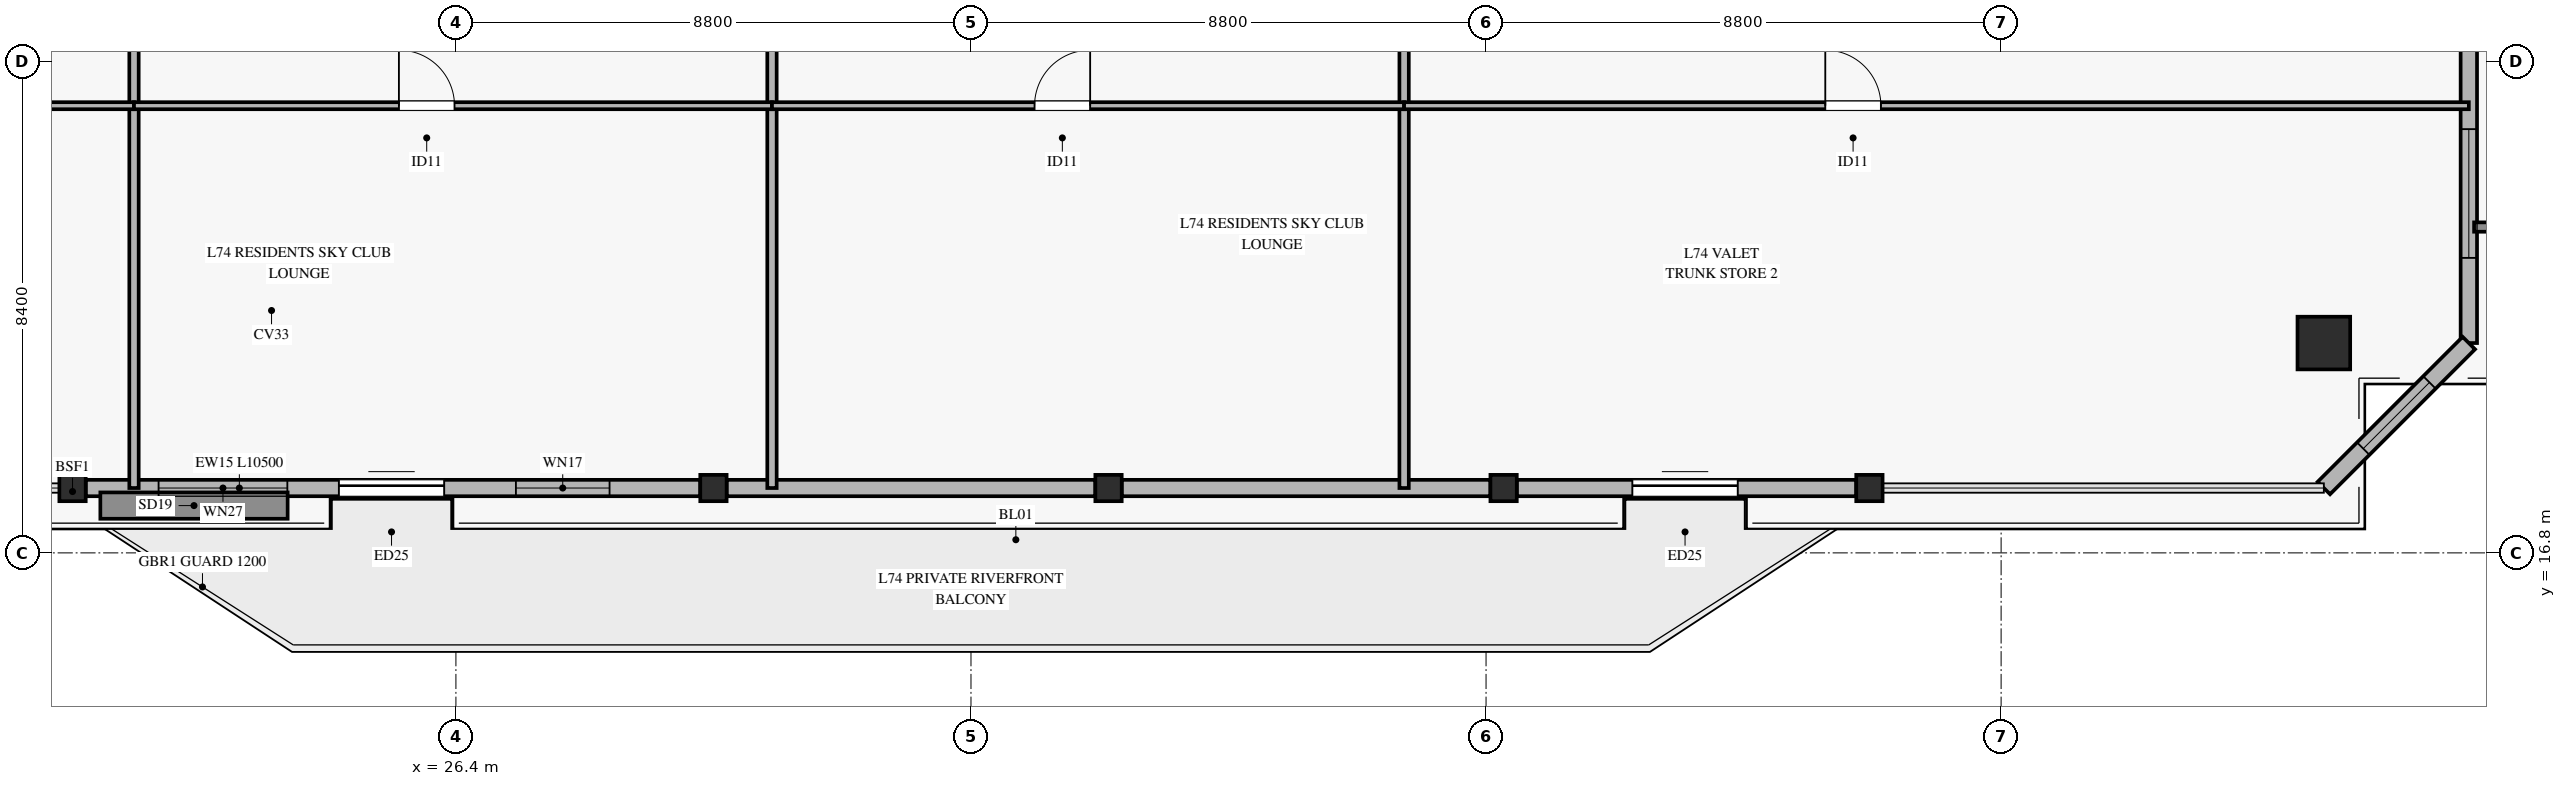
"""IFC4 building model, lengths in metres.
Left out: names, types, materials, properties, quantities, classifications, styles, units other than length and angle.
Written with IfcOpenShell. Run it as: python <this file> out.ifc"""

import sys

from ifc_helpers import new_model, si_unit, direction, frame, frame_2d, origin, origin_2d, place, context, subcontext, project, spatial, rectangle, hollow_rectangle, extrude, source, transform, mapped, element, fill, save


model = new_model("IFC4")
c1 = context("Model", 3, precision=1e-05, world=origin(), true_north=direction((0.0, 1.0)))
c2 = subcontext(c1, "Body", "Model", "MODEL_VIEW")
j1 = project(units=[si_unit("LENGTHUNIT", "METRE"), si_unit("PLANEANGLEUNIT", "RADIAN")], contexts=[c1])
p1 = place(None, origin())
s1 = spatial("IfcSite", under=j1, at=p1, CompositionType="ELEMENT")
p2 = place(p1, origin())
s2 = spatial("IfcBuilding", under=s1, at=p2, CompositionType="ELEMENT")
p3 = place(p2, frame((0.0, 0.0, 290.4)))
s3 = spatial("IfcBuildingStorey", under=s2, at=p3, CompositionType="ELEMENT", Elevation=290.4)
m1 = source(origin(), c2, "Body", "SweptSolid", [
    extrude(hollow_rectangle(XDim=0.9, YDim=0.9, WallThickness=0.04, at=origin_2d()), origin(), (0.0, 0.0, 1.0), 3.327),
])
p4 = place(p3, frame((58.314, 20.385, 0.0), z_axis=(-0.110887345502, 0.266613981607, 0.957403249117), x_axis=(-0.923324865032, -0.384019782842, 0.0)))
e1 = element("IfcColumn", 1, at=p4, inside=s3, PredefinedType="COLUMN", context=c2, shape_type="MappedRepresentation", body=[
    mapped(m1, transform((0.0, 0.0, 0.0), x_axis=(1.0, 0.0, 0.0), y_axis=(0.0, 1.0, 0.0), z_axis=(0.0, 0.0, 1.0), scale=1.0)),
])
m2 = source(origin(), c2, "Body", "SweptSolid", [
    extrude(hollow_rectangle(XDim=0.45, YDim=0.45, WallThickness=0.022, at=origin_2d()), origin(), (0.0, 0.0, 1.0), 3.319),
])
for number, where, z_axis, x_axis in (
    (2, (19.85, 17.908, 0.0), (0.0, 0.281, 0.96), (-1.0, 0.0, 0.0)),
    (3, (30.8, 17.908, 0.0), (0.0, 0.281, 0.96), (-1.0, 0.0, 0.0)),
    (4, (37.55, 17.908, 0.0), (0.0, 0.281, 0.96), (-1.0, 0.0, 0.0)),
    (5, (44.3, 17.908, 0.0), (0.0, 0.281, 0.96), (-1.0, 0.0, 0.0)),
    (6, (50.55, 17.908, 0.0), (0.0, 0.281, 0.96), (-1.0, 0.0, 0.0)),
):
    element("IfcColumn", number, at=place(p3, frame(where, z_axis=z_axis, x_axis=x_axis)), inside=s3, PredefinedType="COLUMN", context=c2, shape_type="MappedRepresentation", body=[
        mapped(m2, transform((0.0, 0.0, 0.0), x_axis=(1.0, 0.0, 0.0), y_axis=(0.0, 1.0, 0.0), z_axis=(0.0, 0.0, 1.0), scale=1.0)),
    ])
p5 = place(p3, frame((20.075, 17.908, 0.0), z_axis=(0.0, 0.0, 1.0), x_axis=(1.0, 0.0, 0.0)))
e7 = element("IfcWall", 7, at=p5, inside=s3, PredefinedType="SOLIDWALL", context=c2, shape_type="SweptSolid", body=[
    extrude(rectangle(XDim=10.5, YDim=0.28, at=frame_2d((5.25, 0.0))), origin(), (0.0, 0.0, 1.0), 2.815),
])
p6 = place(p5, frame((4.325, 0.0, 0.0)))
e8 = element("IfcOpeningElement", 8, at=p6, cuts=e7, PredefinedType="OPENING", context=c2, shape_type="SweptSolid", body=[
    extrude(rectangle(XDim=1.8, YDim=2.25, at=frame_2d((0.9, 1.125))), frame((0.0, 0.15, 0.0), z_axis=(0.0, -1.0, 0.0), x_axis=(1.0, 0.0, 0.0)), (0.0, 0.0, 1.0), 0.3),
])
p7 = place(p5, frame((1.245, 0.0, 0.45)))
e9 = element("IfcOpeningElement", 9, at=p7, cuts=e7, PredefinedType="OPENING", context=c2, shape_type="SweptSolid", body=[
    extrude(rectangle(XDim=2.2, YDim=2.1, at=frame_2d((1.1, 1.05))), frame((0.0, 0.15, 0.0), z_axis=(0.0, -1.0, 0.0), x_axis=(1.0, 0.0, 0.0)), (0.0, 0.0, 1.0), 0.3),
])
p8 = place(p5, frame((7.35, 0.0, 0.45)))
e10 = element("IfcOpeningElement", 10, at=p8, cuts=e7, PredefinedType="OPENING", context=c2, shape_type="SweptSolid", body=[
    extrude(rectangle(XDim=1.6, YDim=2.0, at=frame_2d((0.8, 1.0))), frame((0.0, 0.15, 0.0), z_axis=(0.0, -1.0, 0.0), x_axis=(1.0, 0.0, 0.0)), (0.0, 0.0, 1.0), 0.3),
])
for number, where, z_axis, x_axis in (
    (11, (31.025, 17.908, 0.0), (0.0, 0.0, 1.0), (1.0, 0.0, 0.0)),
    (12, (37.775, 17.908, 0.0), (0.0, 0.0, 1.0), (1.0, 0.0, 0.0)),
):
    element("IfcWall", number, at=place(p3, frame(where, z_axis=z_axis, x_axis=x_axis)), inside=s3, PredefinedType="SOLIDWALL", context=c2, shape_type="SweptSolid", body=[
        extrude(rectangle(XDim=6.3, YDim=0.28, at=frame_2d((3.15, 0.0))), origin(), (0.0, 0.0, 1.0), 2.815),
    ])
p9 = place(p3, frame((44.525, 17.908, 0.0), z_axis=(0.0, 0.0, 1.0), x_axis=(1.0, 0.0, 0.0)))
e13 = element("IfcWall", 13, at=p9, inside=s3, PredefinedType="SOLIDWALL", context=c2, shape_type="SweptSolid", body=[
    extrude(rectangle(XDim=5.8, YDim=0.28, at=frame_2d((2.9, 0.0))), origin(), (0.0, 0.0, 1.0), 2.815),
])
p10 = place(p9, frame((1.975, 0.0, 0.0)))
e14 = element("IfcOpeningElement", 14, at=p10, cuts=e13, PredefinedType="OPENING", context=c2, shape_type="SweptSolid", body=[
    extrude(rectangle(XDim=1.8, YDim=2.25, at=frame_2d((0.9, 1.125))), frame((0.0, 0.15, 0.0), z_axis=(0.0, -1.0, 0.0), x_axis=(1.0, 0.0, 0.0)), (0.0, 0.0, 1.0), 0.3),
])
p11 = place(p3, frame((60.791, 20.385, 0.0), z_axis=(0.0, 0.0, 1.0), x_axis=(0.0, 1.0, 0.0)))
e15 = element("IfcWall", 15, at=p11, inside=s3, PredefinedType="SOLIDWALL", context=c2, shape_type="SweptSolid", body=[
    extrude(rectangle(XDim=11.394, YDim=0.28, at=frame_2d((5.697, 0.0))), origin(), (0.0, 0.0, 1.0), 2.815),
])
p12 = place(p11, frame((1.455, 0.0, 0.45)))
e16 = element("IfcOpeningElement", 16, at=p12, cuts=e15, PredefinedType="OPENING", context=c2, shape_type="SweptSolid", body=[
    extrude(rectangle(XDim=2.2, YDim=2.1, at=frame_2d((1.1, 1.05))), frame((0.0, 0.15, 0.0), z_axis=(0.0, -1.0, 0.0), x_axis=(1.0, 0.0, 0.0)), (0.0, 0.0, 1.0), 0.3),
])
p13 = place(p11, frame((6.854, 0.0, 0.45)))
e17 = element("IfcOpeningElement", 17, at=p13, cuts=e15, PredefinedType="OPENING", context=c2, shape_type="SweptSolid", body=[
    extrude(rectangle(XDim=2.2, YDim=2.1, at=frame_2d((1.1, 1.05))), frame((0.0, 0.15, 0.0), z_axis=(0.0, -1.0, 0.0), x_axis=(1.0, 0.0, 0.0)), (0.0, 0.0, 1.0), 0.3),
])
p14 = place(p3, frame((58.314, 17.908, 0.0), z_axis=(0.0, 0.0, 1.0), x_axis=(0.707106781187, 0.707106781187, 0.0)))
e18 = element("IfcWall", 18, at=p14, inside=s3, PredefinedType="SOLIDWALL", context=c2, shape_type="SweptSolid", body=[
    extrude(rectangle(XDim=3.503, YDim=0.3, at=frame_2d((1.751, 0.0))), origin(), (0.0, 0.0, 1.0), 2.815),
])
p15 = place(p14, frame((0.952, 0.0, 0.45)))
e19 = element("IfcOpeningElement", 19, at=p15, cuts=e18, PredefinedType="OPENING", context=c2, shape_type="SweptSolid", body=[
    extrude(rectangle(XDim=1.6, YDim=2.0, at=frame_2d((0.8, 1.0))), frame((0.0, 0.16, 0.0), z_axis=(0.0, -1.0, 0.0), x_axis=(1.0, 0.0, 0.0)), (0.0, 0.0, 1.0), 0.32),
])
for number, where, z_axis, x_axis in (
    (20, (20.9, 17.908, 0.0), (0.0, 0.0, 1.0), (0.0, 1.0, 0.0)),
    (21, (31.8, 17.908, 0.0), (0.0, 0.0, 1.0), (0.0, 1.0, 0.0)),
    (22, (42.6, 17.908, 0.0), (0.0, 0.0, 1.0), (0.0, 1.0, 0.0)),
):
    element("IfcWall", number, at=place(p3, frame(where, z_axis=z_axis, x_axis=x_axis)), inside=s3, PredefinedType="PARTITIONING", context=c2, shape_type="SweptSolid", body=[
        extrude(rectangle(XDim=17.092, YDim=0.16, at=frame_2d((8.546, 0.0))), origin(), (0.0, 0.0, 1.0), 2.77),
    ])
p16 = place(p3, frame((9.609, 24.44, 0.0), z_axis=(0.0, 0.0, 1.0), x_axis=(1.0, 0.0, 0.0)))
e23 = element("IfcWall", 23, at=p16, inside=s3, PredefinedType="PARTITIONING", context=c2, shape_type="SweptSolid", body=[
    extrude(rectangle(XDim=11.291, YDim=0.12, at=frame_2d((5.646, 0.0))), origin(), (0.0, 0.0, 1.0), 2.47),
])
p17 = place(p16, frame((5.051, 0.0, 0.0)))
e24 = element("IfcOpeningElement", 24, at=p17, cuts=e23, PredefinedType="OPENING", context=c2, shape_type="SweptSolid", body=[
    extrude(rectangle(XDim=0.95, YDim=2.1, at=frame_2d((0.475, 1.05))), frame((0.0, 0.07, 0.0), z_axis=(0.0, -1.0, 0.0), x_axis=(1.0, 0.0, 0.0)), (0.0, 0.0, 1.0), 0.14),
])
p18 = place(p3, frame((20.9, 24.44, 0.0), z_axis=(0.0, 0.0, 1.0), x_axis=(1.0, 0.0, 0.0)))
e25 = element("IfcWall", 25, at=p18, inside=s3, PredefinedType="PARTITIONING", context=c2, shape_type="SweptSolid", body=[
    extrude(rectangle(XDim=10.9, YDim=0.12, at=frame_2d((5.45, 0.0))), origin(), (0.0, 0.0, 1.0), 2.47),
])
p19 = place(p18, frame((4.526, 0.0, 0.0)))
e26 = element("IfcOpeningElement", 26, at=p19, cuts=e25, PredefinedType="OPENING", context=c2, shape_type="SweptSolid", body=[
    extrude(rectangle(XDim=0.95, YDim=2.1, at=frame_2d((0.475, 1.05))), frame((0.0, 0.07, 0.0), z_axis=(0.0, -1.0, 0.0), x_axis=(1.0, 0.0, 0.0)), (0.0, 0.0, 1.0), 0.14),
])
p20 = place(p3, frame((31.8, 24.44, 0.0), z_axis=(0.0, 0.0, 1.0), x_axis=(1.0, 0.0, 0.0)))
e27 = element("IfcWall", 27, at=p20, inside=s3, PredefinedType="PARTITIONING", context=c2, shape_type="SweptSolid", body=[
    extrude(rectangle(XDim=10.8, YDim=0.12, at=frame_2d((5.4, 0.0))), origin(), (0.0, 0.0, 1.0), 2.47),
])
p21 = place(p20, frame((4.486, 0.0, 0.0)))
e28 = element("IfcOpeningElement", 28, at=p21, cuts=e27, PredefinedType="OPENING", context=c2, shape_type="SweptSolid", body=[
    extrude(rectangle(XDim=0.95, YDim=2.1, at=frame_2d((0.475, 1.05))), frame((0.0, 0.07, 0.0), z_axis=(0.0, -1.0, 0.0), x_axis=(1.0, 0.0, 0.0)), (0.0, 0.0, 1.0), 0.14),
])
p22 = place(p3, frame((42.6, 24.44, 0.0), z_axis=(0.0, 0.0, 1.0), x_axis=(1.0, 0.0, 0.0)))
e29 = element("IfcWall", 29, at=p22, inside=s3, PredefinedType="PARTITIONING", context=c2, shape_type="SweptSolid", body=[
    extrude(rectangle(XDim=18.191, YDim=0.12, at=frame_2d((9.095, 0.0))), origin(), (0.0, 0.0, 1.0), 2.47),
])
p23 = place(p22, frame((7.196, 0.0, 0.0)))
e30 = element("IfcOpeningElement", 30, at=p23, cuts=e29, PredefinedType="OPENING", context=c2, shape_type="SweptSolid", body=[
    extrude(rectangle(XDim=0.95, YDim=2.1, at=frame_2d((0.475, 1.05))), frame((0.0, 0.07, 0.0), z_axis=(0.0, -1.0, 0.0), x_axis=(1.0, 0.0, 0.0)), (0.0, 0.0, 1.0), 0.14),
])
m3 = source(origin(), c2, "Body", "SweptSolid", [
    extrude(rectangle(XDim=1.8, YDim=2.25, at=frame_2d((0.9, 1.125))), frame((0.0, 0.025, 0.0), z_axis=(0.0, -1.0, 0.0), x_axis=(1.0, 0.0, 0.0)), (0.0, 0.0, 1.0), 0.05),
])
p24 = place(p6, origin())
e31 = element("IfcDoor", 31, at=p24, inside=s3, OperationType="SLIDING_TO_LEFT", PredefinedType="DOOR", context=c2, shape_type="MappedRepresentation", body=[
    mapped(m3, transform((0.0, 0.0, 0.0), x_axis=(1.0, 0.0, 0.0), y_axis=(0.0, 1.0, 0.0), z_axis=(0.0, 0.0, 1.0), scale=1.0)),
])
fill(e8, e31)
m4 = source(origin(), c2, "Body", "SweptSolid", [
    extrude(rectangle(XDim=2.2, YDim=2.1, at=frame_2d((1.1, 1.05))), frame((0.0, 0.03, 0.0), z_axis=(0.0, -1.0, 0.0), x_axis=(1.0, 0.0, 0.0)), (0.0, 0.0, 1.0), 0.06),
])
p25 = place(p7, origin())
e32 = element("IfcWindow", 32, at=p25, inside=s3, PartitioningType="SINGLE_PANEL", PredefinedType="WINDOW", context=c2, shape_type="MappedRepresentation", body=[
    mapped(m4, transform((0.0, 0.0, 0.0), x_axis=(1.0, 0.0, 0.0), y_axis=(0.0, 1.0, 0.0), z_axis=(0.0, 0.0, 1.0), scale=1.0)),
])
fill(e9, e32)
m5 = source(origin(), c2, "Body", "SweptSolid", [
    extrude(rectangle(XDim=1.6, YDim=2.0, at=frame_2d((0.8, 1.0))), frame((0.0, 0.03, 0.0), z_axis=(0.0, -1.0, 0.0), x_axis=(1.0, 0.0, 0.0)), (0.0, 0.0, 1.0), 0.06),
])
p26 = place(p8, origin())
e33 = element("IfcWindow", 33, at=p26, inside=s3, PartitioningType="SINGLE_PANEL", PredefinedType="WINDOW", context=c2, shape_type="MappedRepresentation", body=[
    mapped(m5, transform((0.0, 0.0, 0.0), x_axis=(1.0, 0.0, 0.0), y_axis=(0.0, 1.0, 0.0), z_axis=(0.0, 0.0, 1.0), scale=1.0)),
])
fill(e10, e33)
p27 = place(p10, origin())
e34 = element("IfcDoor", 34, at=p27, inside=s3, OperationType="SLIDING_TO_LEFT", PredefinedType="DOOR", context=c2, shape_type="MappedRepresentation", body=[
    mapped(m3, transform((0.0, 0.0, 0.0), x_axis=(1.0, 0.0, 0.0), y_axis=(0.0, 1.0, 0.0), z_axis=(0.0, 0.0, 1.0), scale=1.0)),
])
fill(e14, e34)
p28 = place(p12, origin())
e35 = element("IfcWindow", 35, at=p28, inside=s3, PartitioningType="SINGLE_PANEL", PredefinedType="WINDOW", context=c2, shape_type="MappedRepresentation", body=[
    mapped(m4, transform((0.0, 0.0, 0.0), x_axis=(1.0, 0.0, 0.0), y_axis=(0.0, 1.0, 0.0), z_axis=(0.0, 0.0, 1.0), scale=1.0)),
])
fill(e16, e35)
p29 = place(p15, origin())
e36 = element("IfcWindow", 36, at=p29, inside=s3, PartitioningType="SINGLE_PANEL", PredefinedType="WINDOW", context=c2, shape_type="MappedRepresentation", body=[
    mapped(m5, transform((0.0, 0.0, 0.0), x_axis=(1.0, 0.0, 0.0), y_axis=(0.0, 1.0, 0.0), z_axis=(0.0, 0.0, 1.0), scale=1.0)),
])
fill(e19, e36)
m6 = source(origin(), c2, "Body", "SweptSolid", [
    extrude(rectangle(XDim=0.95, YDim=2.1, at=frame_2d((0.475, 1.05))), frame((0.0, 0.025, 0.0), z_axis=(0.0, -1.0, 0.0), x_axis=(1.0, 0.0, 0.0)), (0.0, 0.0, 1.0), 0.05),
])
p30 = place(p19, origin())
e37 = element("IfcDoor", 37, at=p30, inside=s3, OperationType="SINGLE_SWING_LEFT", PredefinedType="DOOR", context=c2, shape_type="MappedRepresentation", body=[
    mapped(m6, transform((0.0, 0.0, 0.0), x_axis=(1.0, 0.0, 0.0), y_axis=(0.0, 1.0, 0.0), z_axis=(0.0, 0.0, 1.0), scale=1.0)),
])
fill(e26, e37)
p31 = place(p21, origin())
e38 = element("IfcDoor", 38, at=p31, inside=s3, OperationType="SINGLE_SWING_RIGHT", PredefinedType="DOOR", context=c2, shape_type="MappedRepresentation", body=[
    mapped(m6, transform((0.0, 0.0, 0.0), x_axis=(1.0, 0.0, 0.0), y_axis=(0.0, 1.0, 0.0), z_axis=(0.0, 0.0, 1.0), scale=1.0)),
])
fill(e28, e38)
p32 = place(p23, origin())
e39 = element("IfcDoor", 39, at=p32, inside=s3, OperationType="SINGLE_SWING_LEFT", PredefinedType="DOOR", context=c2, shape_type="MappedRepresentation", body=[
    mapped(m6, transform((0.0, 0.0, 0.0), x_axis=(1.0, 0.0, 0.0), y_axis=(0.0, 1.0, 0.0), z_axis=(0.0, 0.0, 1.0), scale=1.0)),
])
fill(e30, e39)
save(model, sys.argv[1])
